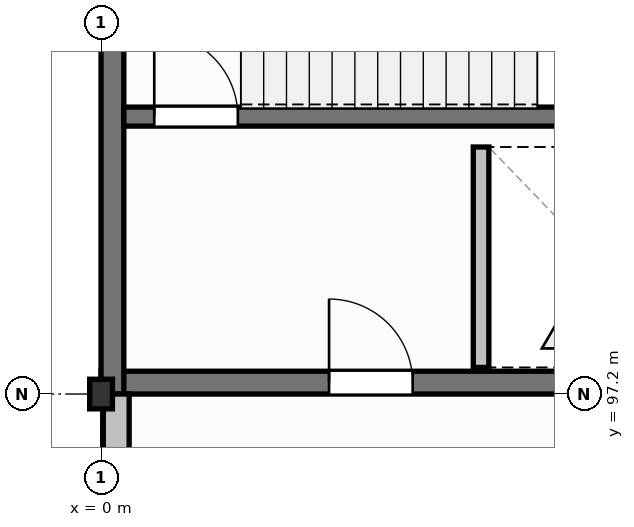
"""IFC4 building model, lengths in metres.
Left out: names, types, materials, properties, quantities, classifications, styles, units other than length and angle.
Written with IfcOpenShell. Run it as: python <this file> out.ifc"""

import sys

from ifc_helpers import new_model, si_unit, direction, frame, frame_2d, origin, origin_2d, place, context, subcontext, project, spatial, rectangle, i_section, extrude, element, fill, save


model = new_model("IFC4")
c1 = context("Model", 3, precision=1e-05, world=origin(), true_north=direction((0.0, 1.0)))
c2 = subcontext(c1, "Body", "Model", "MODEL_VIEW")
j1 = project(units=[si_unit("LENGTHUNIT", "METRE"), si_unit("PLANEANGLEUNIT", "RADIAN")], contexts=[c1])
p1 = place(None, origin())
s1 = spatial("IfcSite", under=j1, at=p1, CompositionType="ELEMENT")
p2 = place(p1, origin())
s2 = spatial("IfcBuilding", under=s1, at=p2, CompositionType="ELEMENT")
p3 = place(p2, frame((0.0, 0.0, 13.2)))
s3 = spatial("IfcBuildingStorey", under=s2, at=p3, CompositionType="ELEMENT", Elevation=13.2)
p4 = place(p3, frame((0.0, 97.35, 0.0), z_axis=(0.0, 0.0, 1.0), x_axis=(1.0, 0.0, 0.0)))
e1 = element("IfcWall", 1, at=p4, inside=s3, PredefinedType="SHEAR", context=c2, shape_type="SweptSolid", body=[
    extrude(rectangle(XDim=8.4, YDim=0.3, at=frame_2d((4.2, 0.0))), origin(), (0.0, 0.0, 1.0), 4.05),
])
p5 = place(p4, frame((3.0, 0.0, 0.0)))
e2 = element("IfcOpeningElement", 2, at=p5, cuts=e1, PredefinedType="OPENING", context=c2, shape_type="SweptSolid", body=[
    extrude(rectangle(XDim=1.1, YDim=2.15, at=frame_2d((0.55, 1.075))), frame((0.0, 0.16, 0.0), z_axis=(0.0, -1.0, 0.0), x_axis=(1.0, 0.0, 0.0)), (0.0, 0.0, 1.0), 0.32),
])
p6 = place(p3, frame((0.15, 97.2, 0.0), z_axis=(0.0, 0.0, 1.0), x_axis=(0.0, 1.0, 0.0)))
e3 = element("IfcWall", 3, at=p6, inside=s3, PredefinedType="SHEAR", context=c2, shape_type="SweptSolid", body=[
    extrude(rectangle(XDim=7.2, YDim=0.3, at=frame_2d((3.6, 0.0))), origin(), (0.0, 0.0, 1.0), 4.05),
])
p7 = place(p3, frame((0.3, 100.85, 0.0), z_axis=(0.0, 0.0, 1.0), x_axis=(1.0, 0.0, 0.0)))
e4 = element("IfcWall", 4, at=p7, inside=s3, PredefinedType="SHEAR", context=c2, shape_type="SweptSolid", body=[
    extrude(rectangle(XDim=7.8, YDim=0.25, at=frame_2d((3.9, 0.0))), origin(), (0.0, 0.0, 1.0), 4.05),
])
p8 = place(p7, frame((0.4, 0.0, 0.0)))
e5 = element("IfcOpeningElement", 5, at=p8, cuts=e4, PredefinedType="OPENING", context=c2, shape_type="SweptSolid", body=[
    extrude(rectangle(XDim=1.1, YDim=2.15, at=frame_2d((0.55, 1.075))), frame((0.0, 0.135, 0.0), z_axis=(0.0, -1.0, 0.0), x_axis=(1.0, 0.0, 0.0)), (0.0, 0.0, 1.0), 0.27),
])
p9 = place(p3, frame((0.0, 97.2, 0.0), z_axis=(0.0, 0.0, 1.0), x_axis=(1.0, 0.0, 0.0)))
e6 = element("IfcColumn", 6, at=p9, inside=s3, PredefinedType="COLUMN", context=c2, shape_type="SweptSolid", body=[
    extrude(i_section(OverallWidth=0.3, OverallDepth=0.39, WebThickness=0.011, FlangeThickness=0.019, FilletRadius=0.027, at=origin_2d()), origin(), (0.0, 0.0, 1.0), 4.05),
])
p10 = place(p3, frame((0.2, 90.0, 0.0), z_axis=(0.0, 0.0, 1.0), x_axis=(0.0, 1.0, 0.0)))
e7 = element("IfcWall", 7, at=p10, inside=s3, PredefinedType="SOLIDWALL", context=c2, shape_type="SweptSolid", body=[
    extrude(rectangle(XDim=7.2, YDim=0.34, at=frame_2d((3.6, 0.0))), origin(), (0.0, 0.0, 1.0), 3.378),
])
p11 = place(p10, frame((1.2, 0.0, 0.85)))
e8 = element("IfcOpeningElement", 8, at=p11, cuts=e7, PredefinedType="OPENING", context=c2, shape_type="SweptSolid", body=[
    extrude(rectangle(XDim=2.4, YDim=2.05, at=frame_2d((1.2, 1.025))), frame((0.0, 0.18, 0.0), z_axis=(0.0, -1.0, 0.0), x_axis=(1.0, 0.0, 0.0)), (0.0, 0.0, 1.0), 0.36),
])
p12 = place(p10, frame((4.175, 0.0, 0.85)))
e9 = element("IfcOpeningElement", 9, at=p12, cuts=e7, PredefinedType="OPENING", context=c2, shape_type="SweptSolid", body=[
    extrude(rectangle(XDim=1.25, YDim=1.5, at=frame_2d((0.625, 0.75))), frame((0.0, 0.18, 0.0), z_axis=(0.0, -1.0, 0.0), x_axis=(1.0, 0.0, 0.0)), (0.0, 0.0, 1.0), 0.36),
])
p13 = place(p3, frame((5.0, 97.55, 0.0), z_axis=(0.0, 0.0, 1.0), x_axis=(0.0, 1.0, 0.0)))
e10 = element("IfcWall", 10, at=p13, inside=s3, PredefinedType="PARTITIONING", context=c2, shape_type="SweptSolid", body=[
    extrude(rectangle(XDim=2.9, YDim=0.205, at=frame_2d((1.45, 0.0))), origin(), (0.0, 0.0, 1.0), 3.78),
])
p14 = place(p8, origin())
e11 = element("IfcDoor", 11, at=p14, inside=s3, OperationType="SINGLE_SWING_LEFT", PredefinedType="DOOR", context=c2, shape_type="SweptSolid", body=[
    extrude(rectangle(XDim=1.1, YDim=2.15, at=frame_2d((0.55, 1.075))), frame((0.0, 0.025, 0.0), z_axis=(0.0, -1.0, 0.0), x_axis=(1.0, 0.0, 0.0)), (0.0, 0.0, 1.0), 0.05),
])
fill(e5, e11)
p15 = place(p5, origin())
e12 = element("IfcDoor", 12, at=p15, inside=s3, OperationType="SINGLE_SWING_LEFT", PredefinedType="DOOR", context=c2, shape_type="SweptSolid", body=[
    extrude(rectangle(XDim=1.1, YDim=2.15, at=frame_2d((0.55, 1.075))), frame((0.0, 0.025, 0.0), z_axis=(0.0, -1.0, 0.0), x_axis=(1.0, 0.0, 0.0)), (0.0, 0.0, 1.0), 0.05),
])
fill(e2, e12)
save(model, sys.argv[1])
